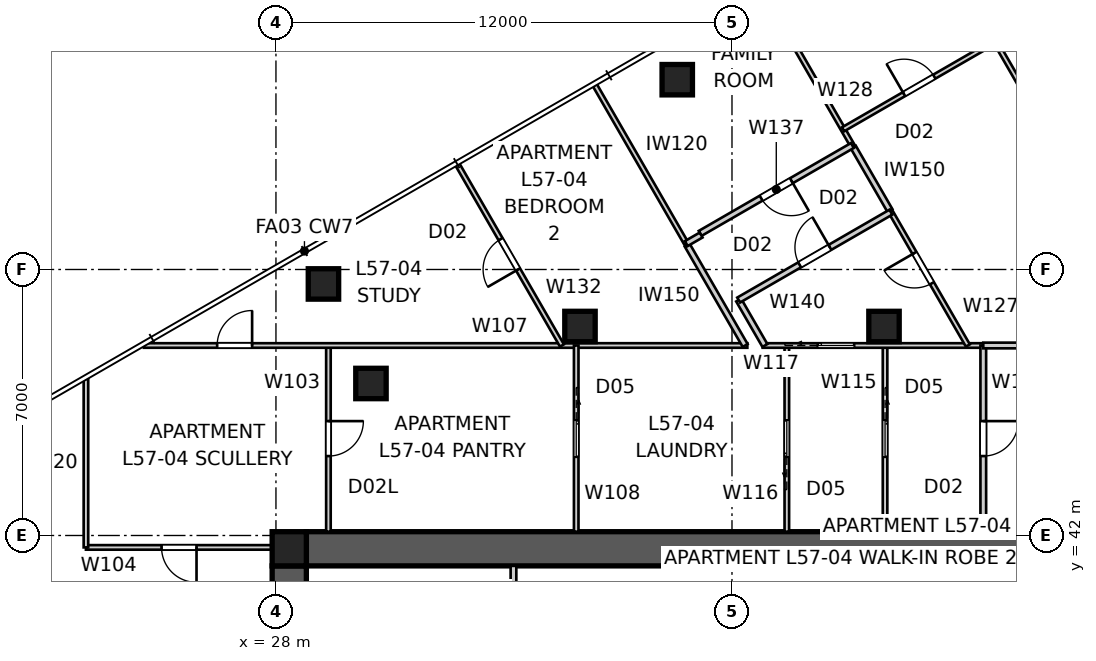
"""IFC4 building model, lengths in metres.
Left out: names, types, materials, properties, quantities, classifications, styles, units other than length and angle.
Written with IfcOpenShell. Run it as: python <this file> out.ifc"""

import sys

from ifc_helpers import new_model, si_unit, direction, frame, frame_2d, origin, origin_2d, place, context, subcontext, project, spatial, polyline, rectangle, outline, extrude, element, fill, save


model = new_model("IFC4")
c1 = context("Model", 3, precision=1e-05, world=origin(), true_north=direction((0.0, 1.0)))
c2 = subcontext(c1, "Body", "Model", "MODEL_VIEW")
j1 = project(units=[si_unit("LENGTHUNIT", "METRE"), si_unit("PLANEANGLEUNIT", "RADIAN")], contexts=[c1])
p1 = place(None, origin())
s1 = spatial("IfcSite", under=j1, at=p1, CompositionType="ELEMENT")
p2 = place(p1, origin())
s2 = spatial("IfcBuilding", under=s1, at=p2, CompositionType="ELEMENT")
p3 = place(p2, frame((0.0, 0.0, 208.2)))
s3 = spatial("IfcBuildingStorey", under=s2, at=p3, CompositionType="ELEMENT", Elevation=208.2)
p4 = place(p3, frame((28.8, 41.65, 0.0), z_axis=(0.0, 0.0, 1.0), x_axis=(1.0, 0.0, 0.0)))
e1 = element("IfcWall", 1, at=p4, inside=s3, PredefinedType="SHEAR", context=c2, shape_type="SweptSolid", body=[
    extrude(outline(polyline([(0.0, -0.45), (22.4, -0.45), (22.4, -0.025), (22.85, -0.025), (22.85, 0.025), (22.4, 0.025), (22.4, 0.45), (0.0, 0.45), (0.0, 0.025), (-0.45, 0.025), (-0.45, -0.025), (0.0, -0.025), (0.0, -0.45)])), origin(), (0.0, 0.0, 1.0), 3.4),
])
p5 = place(p3, frame((28.35, 41.2, 0.0), z_axis=(0.0, 0.0, 1.0), x_axis=(0.0, -1.0, 0.0)))
e2 = element("IfcWall", 2, at=p5, inside=s3, PredefinedType="SHEAR", context=c2, shape_type="SweptSolid", body=[
    extrude(outline(polyline([(0.0, -0.45), (22.4, -0.45), (22.4, -0.025), (22.85, -0.025), (22.85, 0.025), (22.4, 0.025), (22.4, 0.45), (0.0, 0.45), (0.0, 0.025), (-0.45, 0.025), (-0.45, -0.025), (0.0, -0.025), (0.0, -0.45)])), origin(), (0.0, 0.0, 1.0), 3.4),
])
p6 = place(p5, frame((11.14, 0.0, 0.0)))
e3 = element("IfcOpeningElement", 3, at=p6, cuts=e2, PredefinedType="OPENING", context=c2, shape_type="SweptSolid", body=[
    extrude(rectangle(XDim=1.02, YDim=2.4, at=frame_2d((0.51, 1.2))), frame((0.0, 0.46, 0.0), z_axis=(0.0, -1.0, 0.0), x_axis=(1.0, 0.0, 0.0)), (0.0, 0.0, 1.0), 0.92),
])
p7 = place(p3, frame((28.35, 41.65, 0.0), z_axis=(0.0, 0.0, 1.0), x_axis=(1.0, 0.0, 0.0)))
e4 = element("IfcColumn", 4, at=p7, inside=s3, PredefinedType="COLUMN", context=c2, shape_type="SweptSolid", body=[
    extrude(rectangle(XDim=0.9, YDim=0.9, at=origin_2d()), origin(), (0.0, 0.0, 1.0), 3.4),
])
for number, where, z_axis, x_axis in (
    (5, (38.56, 53.995, -0.15), (0.0, 0.0, 1.0), (1.0, 0.0, 0.0)),
    (6, (29.25, 48.62, -0.15), (0.0, 0.0, 1.0), (1.0, 0.0, 0.0)),
):
    element("IfcColumn", number, at=place(p3, frame(where, z_axis=z_axis, x_axis=x_axis)), inside=s3, PredefinedType="COLUMN", context=c2, shape_type="SweptSolid", body=[
        extrude(rectangle(XDim=0.8, YDim=0.8, at=origin_2d()), origin(), (0.0, 0.0, 1.0), 3.55),
    ])
for number, where, z_axis, x_axis in (
    (7, (44.0, 47.5, 0.0), (0.0, 0.0, 1.0), (1.0, 0.0, 0.0)),
    (8, (36.0, 47.5, 0.0), (0.0, 0.0, 1.0), (1.0, 0.0, 0.0)),
    (9, (30.5, 46.0, 0.0), (0.0, 0.0, 1.0), (1.0, 0.0, 0.0)),
):
    element("IfcColumn", number, at=place(p3, frame(where, z_axis=z_axis, x_axis=x_axis)), inside=s3, PredefinedType="COLUMN", context=c2, shape_type="SweptSolid", body=[
        extrude(rectangle(XDim=0.8, YDim=0.8, at=origin_2d()), origin(), (0.0, 0.0, 1.0), 3.4),
    ])
p8 = place(p3, frame((34.25, 41.2, 0.0), z_axis=(0.0, 0.0, 1.0), x_axis=(0.0, -1.0, 0.0)))
e10 = element("IfcWall", 10, at=p8, inside=s3, PredefinedType="SOLIDWALL", context=c2, shape_type="SweptSolid", body=[
    extrude(rectangle(XDim=5.95, YDim=0.15, at=frame_2d((2.975, 0.0))), origin(), (0.0, 0.0, 1.0), 3.25),
])
p9 = place(p8, frame((2.515, 0.0, 0.0)))
e11 = element("IfcOpeningElement", 11, at=p9, cuts=e10, PredefinedType="OPENING", context=c2, shape_type="SweptSolid", body=[
    extrude(rectangle(XDim=0.92, YDim=2.1, at=frame_2d((0.46, 1.05))), frame((0.0, 0.085, 0.0), z_axis=(0.0, -1.0, 0.0), x_axis=(1.0, 0.0, 0.0)), (0.0, 0.0, 1.0), 0.17),
])
p10 = place(p3, frame((29.381, 47.0, 0.0), z_axis=(0.0, 0.0, 1.0), x_axis=(0.0, -1.0, 0.0)))
e12 = element("IfcWall", 12, at=p10, inside=s3, PredefinedType="PARTITIONING", context=c2, shape_type="SweptSolid", body=[
    extrude(rectangle(XDim=4.9, YDim=0.12, at=frame_2d((2.45, 0.0))), origin(), (0.0, 0.0, 1.0), 3.25),
])
p11 = place(p10, frame((1.99, 0.0, 0.0)))
e13 = element("IfcOpeningElement", 13, at=p11, cuts=e12, PredefinedType="OPENING", context=c2, shape_type="SweptSolid", body=[
    extrude(rectangle(XDim=0.92, YDim=2.1, at=frame_2d((0.46, 1.05))), frame((0.0, 0.07, 0.0), z_axis=(0.0, -1.0, 0.0), x_axis=(1.0, 0.0, 0.0)), (0.0, 0.0, 1.0), 0.14),
])
p12 = place(p3, frame((27.9, 41.687, 0.0), z_axis=(0.0, 0.0, 1.0), x_axis=(-1.0, 0.0, 0.0)))
e14 = element("IfcWall", 14, at=p12, inside=s3, PredefinedType="PARTITIONING", context=c2, shape_type="SweptSolid", body=[
    extrude(rectangle(XDim=4.9, YDim=0.12, at=frame_2d((2.45, 0.0))), origin(), (0.0, 0.0, 1.0), 3.25),
])
p13 = place(p12, frame((1.99, 0.0, 0.0)))
e15 = element("IfcOpeningElement", 15, at=p13, cuts=e14, PredefinedType="OPENING", context=c2, shape_type="SweptSolid", body=[
    extrude(rectangle(XDim=0.92, YDim=2.1, at=frame_2d((0.46, 1.05))), frame((0.0, 0.07, 0.0), z_axis=(0.0, -1.0, 0.0), x_axis=(1.0, 0.0, 0.0)), (0.0, 0.0, 1.0), 0.14),
])
p14 = place(p3, frame((23.0, 41.687, 0.0), z_axis=(0.0, 0.0, 1.0), x_axis=(0.0, 1.0, 0.0)))
e16 = element("IfcWall", 16, at=p14, inside=s3, PredefinedType="PARTITIONING", context=c2, shape_type="SweptSolid", body=[
    extrude(rectangle(XDim=4.433, YDim=0.12, at=frame_2d((2.216, 0.0))), origin(), (0.0, 0.0, 1.0), 3.25),
])
p15 = place(p3, frame((24.525, 47.0, 0.0), z_axis=(0.0, 0.0, 1.0), x_axis=(1.0, 0.0, 0.0)))
e17 = element("IfcWall", 17, at=p15, inside=s3, PredefinedType="PARTITIONING", context=c2, shape_type="SweptSolid", body=[
    extrude(rectangle(XDim=15.879, YDim=0.12, at=frame_2d((7.939, 0.0))), origin(), (0.0, 0.0, 1.0), 2.55),
])
p16 = place(p15, frame((1.928, 0.0, 0.0)))
e18 = element("IfcOpeningElement", 18, at=p16, cuts=e17, PredefinedType="OPENING", context=c2, shape_type="SweptSolid", body=[
    extrude(rectangle(XDim=0.92, YDim=2.1, at=frame_2d((0.46, 1.05))), frame((0.0, 0.07, 0.0), z_axis=(0.0, -1.0, 0.0), x_axis=(1.0, 0.0, 0.0)), (0.0, 0.0, 1.0), 0.14),
])
p17 = place(p3, frame((35.901, 47.0, 0.0), z_axis=(0.0, 0.0, 1.0), x_axis=(0.0, -1.0, 0.0)))
e19 = element("IfcWall", 19, at=p17, inside=s3, PredefinedType="PARTITIONING", context=c2, shape_type="SweptSolid", body=[
    extrude(rectangle(XDim=4.9, YDim=0.12, at=frame_2d((2.45, 0.0))), origin(), (0.0, 0.0, 1.0), 3.25),
])
p18 = place(p17, frame((1.97, 0.0, 0.0)))
e20 = element("IfcOpeningElement", 20, at=p18, cuts=e19, PredefinedType="OPENING", context=c2, shape_type="SweptSolid", body=[
    extrude(rectangle(XDim=0.96, YDim=2.1, at=frame_2d((0.48, 1.05))), frame((0.0, 0.07, 0.0), z_axis=(0.0, -1.0, 0.0), x_axis=(1.0, 0.0, 0.0)), (0.0, 0.0, 1.0), 0.14),
])
p19 = place(p3, frame((44.028, 47.0, 0.0), z_axis=(0.0, 0.0, 1.0), x_axis=(0.0, -1.0, 0.0)))
e21 = element("IfcWall", 21, at=p19, inside=s3, PredefinedType="PARTITIONING", context=c2, shape_type="SweptSolid", body=[
    extrude(rectangle(XDim=4.9, YDim=0.12, at=frame_2d((2.45, 0.0))), origin(), (0.0, 0.0, 1.0), 3.25),
])
p20 = place(p19, frame((1.97, 0.0, 0.0)))
e22 = element("IfcOpeningElement", 22, at=p20, cuts=e21, PredefinedType="OPENING", context=c2, shape_type="SweptSolid", body=[
    extrude(rectangle(XDim=0.96, YDim=2.1, at=frame_2d((0.48, 1.05))), frame((0.0, 0.07, 0.0), z_axis=(0.0, -1.0, 0.0), x_axis=(1.0, 0.0, 0.0)), (0.0, 0.0, 1.0), 0.14),
])
p21 = place(p3, frame((41.443, 42.1, 0.0), z_axis=(0.0, 0.0, 1.0), x_axis=(0.0, 1.0, 0.0)))
e23 = element("IfcWall", 23, at=p21, inside=s3, PredefinedType="PARTITIONING", context=c2, shape_type="SweptSolid", body=[
    extrude(rectangle(XDim=4.9, YDim=0.12, at=frame_2d((2.45, 0.0))), origin(), (0.0, 0.0, 1.0), 3.25),
])
p22 = place(p21, frame((1.97, 0.0, 0.0)))
e24 = element("IfcOpeningElement", 24, at=p22, cuts=e23, PredefinedType="OPENING", context=c2, shape_type="SweptSolid", body=[
    extrude(rectangle(XDim=0.96, YDim=2.1, at=frame_2d((0.48, 1.05))), frame((0.0, 0.07, 0.0), z_axis=(0.0, -1.0, 0.0), x_axis=(1.0, 0.0, 0.0)), (0.0, 0.0, 1.0), 0.14),
])
p23 = place(p3, frame((40.808, 47.0, 0.0), z_axis=(0.0, 0.0, 1.0), x_axis=(1.0, 0.0, 0.0)))
e25 = element("IfcWall", 25, at=p23, inside=s3, PredefinedType="PARTITIONING", context=c2, shape_type="SweptSolid", body=[
    extrude(rectangle(XDim=5.804, YDim=0.12, at=frame_2d((2.902, 0.0))), origin(), (0.0, 0.0, 1.0), 2.55),
])
p24 = place(p23, frame((1.447, 0.0, 0.0)))
e26 = element("IfcOpeningElement", 26, at=p24, cuts=e25, PredefinedType="OPENING", context=c2, shape_type="SweptSolid", body=[
    extrude(rectangle(XDim=0.96, YDim=2.1, at=frame_2d((0.48, 1.05))), frame((0.0, 0.07, 0.0), z_axis=(0.0, -1.0, 0.0), x_axis=(1.0, 0.0, 0.0)), (0.0, 0.0, 1.0), 0.14),
])
p25 = place(p3, frame((46.612, 47.0, 0.0), z_axis=(0.0, 0.0, 1.0), x_axis=(0.0, -1.0, 0.0)))
e27 = element("IfcWall", 27, at=p25, inside=s3, PredefinedType="SOLIDWALL", context=c2, shape_type="SweptSolid", body=[
    extrude(rectangle(XDim=4.9, YDim=0.15, at=frame_2d((2.45, 0.0))), origin(), (0.0, 0.0, 1.0), 3.25),
])
p26 = place(p25, frame((1.99, 0.0, 0.0)))
e28 = element("IfcOpeningElement", 28, at=p26, cuts=e27, PredefinedType="OPENING", context=c2, shape_type="SweptSolid", body=[
    extrude(rectangle(XDim=0.92, YDim=2.34, at=frame_2d((0.46, 1.17))), frame((0.0, 0.085, 0.0), z_axis=(0.0, -1.0, 0.0), x_axis=(1.0, 0.0, 0.0)), (0.0, 0.0, 1.0), 0.17),
])
p27 = place(p3, frame((46.612, 47.0, 0.0), z_axis=(0.0, 0.0, 1.0), x_axis=(1.0, 0.0, 0.0)))
e29 = element("IfcWall", 29, at=p27, inside=s3, PredefinedType="SOLIDWALL", context=c2, shape_type="SweptSolid", body=[
    extrude(rectangle(XDim=2.585, YDim=0.15, at=frame_2d((1.292, 0.0))), origin(), (0.0, 0.0, 1.0), 3.25),
])
p28 = place(p3, frame((43.193, 52.219, 0.0), z_axis=(0.0, 0.0, 1.0), x_axis=(-0.50000634465, 0.866021740668, 0.0)))
e30 = element("IfcWall", 30, at=p28, inside=s3, PredefinedType="PARTITIONING", context=c2, shape_type="SweptSolid", body=[
    extrude(rectangle(XDim=4.814, YDim=0.12, at=frame_2d((2.407, 0.0))), origin(), (0.0, 0.0, 1.0), 3.25),
])
p29 = place(p3, frame((46.207, 47.0, 0.0), z_axis=(0.0, 0.0, 1.0), x_axis=(-0.499986975689, 0.866032923243, 0.0)))
e31 = element("IfcWall", 31, at=p29, inside=s3, PredefinedType="PARTITIONING", context=c2, shape_type="SweptSolid", body=[
    extrude(rectangle(XDim=4.101, YDim=0.12, at=frame_2d((2.051, 0.0))), origin(), (0.0, 0.0, 1.0), 3.25),
])
p30 = place(p29, frame((1.891, 0.0, 0.0)))
e32 = element("IfcOpeningElement", 32, at=p30, cuts=e31, PredefinedType="OPENING", context=c2, shape_type="SweptSolid", body=[
    extrude(rectangle(XDim=0.92, YDim=2.34, at=frame_2d((0.46, 1.17))), frame((0.0, 0.07, 0.0), z_axis=(0.0, -1.0, 0.0), x_axis=(1.0, 0.0, 0.0)), (0.0, 0.0, 1.0), 0.14),
])
p31 = place(p3, frame((42.922, 52.688, 0.0), z_axis=(0.0, 0.0, 1.0), x_axis=(0.866025598446, 0.499999662836, 0.0)))
e33 = element("IfcWall", 33, at=p31, inside=s3, PredefinedType="PARTITIONING", context=c2, shape_type="SweptSolid", body=[
    extrude(rectangle(XDim=4.625, YDim=0.12, at=frame_2d((2.312, 0.0))), origin(), (0.0, 0.0, 1.0), 3.25),
])
p32 = place(p31, frame((1.853, 0.0, 0.0)))
e34 = element("IfcOpeningElement", 34, at=p32, cuts=e33, PredefinedType="OPENING", context=c2, shape_type="SweptSolid", body=[
    extrude(rectangle(XDim=0.92, YDim=2.34, at=frame_2d((0.46, 1.17))), frame((0.0, 0.07, 0.0), z_axis=(0.0, -1.0, 0.0), x_axis=(1.0, 0.0, 0.0)), (0.0, 0.0, 1.0), 0.14),
])
p33 = place(p3, frame((46.792, 55.237, 0.0), z_axis=(0.0, 0.0, 1.0), x_axis=(0.500018023529, -0.866014997645, 0.0)))
e35 = element("IfcWall", 35, at=p33, inside=s3, PredefinedType="PARTITIONING", context=c2, shape_type="SweptSolid", body=[
    extrude(rectangle(XDim=4.576, YDim=0.12, at=frame_2d((2.288, 0.0))), origin(), (0.0, 0.0, 1.0), 3.25),
])
p34 = place(p33, frame((1.964, 0.0, 0.0)))
e36 = element("IfcOpeningElement", 36, at=p34, cuts=e35, PredefinedType="OPENING", context=c2, shape_type="SweptSolid", body=[
    extrude(rectangle(XDim=0.92, YDim=2.34, at=frame_2d((0.46, 1.17))), frame((0.0, 0.07, 0.0), z_axis=(0.0, -1.0, 0.0), x_axis=(1.0, 0.0, 0.0)), (0.0, 0.0, 1.0), 0.14),
])
p35 = place(p3, frame((44.156, 50.552, 0.0), z_axis=(0.0, 0.0, 1.0), x_axis=(-0.50001143954, 0.866018799062, 0.0)))
e37 = element("IfcWall", 37, at=p35, inside=s3, PredefinedType="SOLIDWALL", context=c2, shape_type="SweptSolid", body=[
    extrude(rectangle(XDim=1.926, YDim=0.15, at=frame_2d((0.963, 0.0))), origin(), (0.0, 0.0, 1.0), 3.25),
])
p36 = place(p3, frame((35.525, 47.0, 0.0), z_axis=(0.0, 0.0, 1.0), x_axis=(-0.49997732567, 0.866038494419, 0.0)))
e38 = element("IfcWall", 38, at=p36, inside=s3, PredefinedType="PARTITIONING", context=c2, shape_type="SweptSolid", body=[
    extrude(rectangle(XDim=5.5, YDim=0.12, at=frame_2d((2.75, 0.0))), origin(), (0.0, 0.0, 1.0), 3.25),
])
p37 = place(p36, frame((2.31, 0.0, 0.0)))
e39 = element("IfcOpeningElement", 39, at=p37, cuts=e38, PredefinedType="OPENING", context=c2, shape_type="SweptSolid", body=[
    extrude(rectangle(XDim=0.92, YDim=2.34, at=frame_2d((0.46, 1.17))), frame((0.0, 0.07, 0.0), z_axis=(0.0, -1.0, 0.0), x_axis=(1.0, 0.0, 0.0)), (0.0, 0.0, 1.0), 0.14),
])
p38 = place(p3, frame((36.391, 53.851, 0.0), z_axis=(0.0, 0.0, 1.0), x_axis=(0.500036734544, -0.866004194047, 0.0)))
e40 = element("IfcWall", 40, at=p38, inside=s3, PredefinedType="PARTITIONING", context=c2, shape_type="SweptSolid", body=[
    extrude(rectangle(XDim=4.864, YDim=0.12, at=frame_2d((2.432, 0.0))), origin(), (0.0, 0.0, 1.0), 3.25),
])
p39 = place(p3, frame((38.823, 49.639, 0.0), z_axis=(0.0, 0.0, 1.0), x_axis=(0.499999897272, -0.866025463095, 0.0)))
e41 = element("IfcWall", 41, at=p39, inside=s3, PredefinedType="SOLIDWALL", context=c2, shape_type="SweptSolid", body=[
    extrude(rectangle(XDim=3.047, YDim=0.15, at=frame_2d((1.523, 0.0))), origin(), (0.0, 0.0, 1.0), 3.25),
])
p40 = place(p3, frame((43.168, 52.263, 0.0), z_axis=(0.0, 0.0, 1.0), x_axis=(-0.866025598446, -0.499999662836, 0.0)))
e42 = element("IfcWall", 42, at=p40, inside=s3, PredefinedType="SOLIDWALL", context=c2, shape_type="SweptSolid", body=[
    extrude(rectangle(XDim=4.625, YDim=0.15, at=frame_2d((2.312, 0.0))), origin(), (0.0, 0.0, 1.0), 3.25),
])
p41 = place(p40, frame((1.853, 0.0, 0.0)))
e43 = element("IfcOpeningElement", 43, at=p41, cuts=e42, PredefinedType="OPENING", context=c2, shape_type="SweptSolid", body=[
    extrude(rectangle(XDim=0.92, YDim=2.34, at=frame_2d((0.46, 1.17))), frame((0.0, 0.085, 0.0), z_axis=(0.0, -1.0, 0.0), x_axis=(1.0, 0.0, 0.0)), (0.0, 0.0, 1.0), 0.17),
])
p42 = place(p3, frame((39.188, 49.907, 0.0), z_axis=(0.0, 0.0, 1.0), x_axis=(-0.865896406789, -0.500223362819, 0.0)))
e44 = element("IfcWall", 44, at=p42, inside=s3, PredefinedType="SOLIDWALL", context=c2, shape_type="SweptSolid", body=[
    extrude(rectangle(XDim=0.45, YDim=0.15, at=frame_2d((0.225, 0.0))), origin(), (0.0, 0.0, 1.0), 3.25),
])
p43 = place(p3, frame((40.866, 47.0, 0.0), z_axis=(0.0, 0.0, 1.0), x_axis=(-0.499941797271, 0.866059004538, 0.0)))
e45 = element("IfcWall", 45, at=p43, inside=s3, PredefinedType="SOLIDWALL", context=c2, shape_type="SweptSolid", body=[
    extrude(rectangle(XDim=1.381, YDim=0.15, at=frame_2d((0.69, 0.0))), origin(), (0.0, 0.0, 1.0), 3.25),
])
p44 = place(p3, frame((40.176, 48.196, 0.0), z_axis=(0.0, 0.0, 1.0), x_axis=(0.866025598446, 0.499999662836, 0.0)))
e46 = element("IfcWall", 46, at=p44, inside=s3, PredefinedType="SOLIDWALL", context=c2, shape_type="SweptSolid", body=[
    extrude(rectangle(XDim=4.625, YDim=0.15, at=frame_2d((2.312, 0.0))), origin(), (0.0, 0.0, 1.0), 3.25),
])
p45 = place(p44, frame((1.853, 0.0, 0.0)))
e47 = element("IfcOpeningElement", 47, at=p45, cuts=e46, PredefinedType="OPENING", context=c2, shape_type="SweptSolid", body=[
    extrude(rectangle(XDim=0.92, YDim=2.34, at=frame_2d((0.46, 1.17))), frame((0.0, 0.085, 0.0), z_axis=(0.0, -1.0, 0.0), x_axis=(1.0, 0.0, 0.0)), (0.0, 0.0, 1.0), 0.17),
])
p46 = place(p3, frame((27.9, 41.687, 0.0), z_axis=(0.0, 0.0, 1.0), x_axis=(0.999162409553, -0.040920402453, 0.0)))
e48 = element("IfcWall", 48, at=p46, inside=s3, PredefinedType="PARTITIONING", context=c2, shape_type="SweptSolid", body=[
    extrude(rectangle(XDim=0.901, YDim=0.12, at=frame_2d((0.45, 0.0))), origin(), (0.0, 0.0, 1.0), 3.25),
])
p47 = place(p13, origin())
e49 = element("IfcDoor", 49, at=p47, inside=s3, OperationType="SINGLE_SWING_LEFT", PredefinedType="DOOR", context=c2, shape_type="SweptSolid", body=[
    extrude(rectangle(XDim=0.92, YDim=2.1, at=frame_2d((0.46, 1.05))), frame((0.0, 0.025, 0.0), z_axis=(0.0, -1.0, 0.0), x_axis=(1.0, 0.0, 0.0)), (0.0, 0.0, 1.0), 0.05),
])
fill(e15, e49)
p48 = place(p16, origin())
e50 = element("IfcDoor", 50, at=p48, inside=s3, OperationType="SINGLE_SWING_RIGHT", PredefinedType="DOOR", context=c2, shape_type="SweptSolid", body=[
    extrude(rectangle(XDim=0.92, YDim=2.1, at=frame_2d((0.46, 1.05))), frame((0.0, 0.025, 0.0), z_axis=(0.0, -1.0, 0.0), x_axis=(1.0, 0.0, 0.0)), (0.0, 0.0, 1.0), 0.05),
])
fill(e18, e50)
p49 = place(p11, origin())
e51 = element("IfcDoor", 51, at=p49, inside=s3, OperationType="SINGLE_SWING_LEFT", PredefinedType="DOOR", context=c2, shape_type="SweptSolid", body=[
    extrude(rectangle(XDim=0.92, YDim=2.1, at=frame_2d((0.46, 1.05))), frame((0.0, 0.025, 0.0), z_axis=(0.0, -1.0, 0.0), x_axis=(1.0, 0.0, 0.0)), (0.0, 0.0, 1.0), 0.05),
])
fill(e13, e51)
p50 = place(p37, origin())
e52 = element("IfcDoor", 52, at=p50, inside=s3, OperationType="SINGLE_SWING_LEFT", PredefinedType="DOOR", context=c2, shape_type="SweptSolid", body=[
    extrude(rectangle(XDim=0.92, YDim=2.34, at=frame_2d((0.46, 1.17))), frame((0.0, 0.025, 0.0), z_axis=(0.0, -1.0, 0.0), x_axis=(1.0, 0.0, 0.0)), (0.0, 0.0, 1.0), 0.05),
])
fill(e39, e52)
p51 = place(p18, origin())
e53 = element("IfcDoor", 53, at=p51, inside=s3, OperationType="SLIDING_TO_LEFT", PredefinedType="DOOR", context=c2, shape_type="SweptSolid", body=[
    extrude(rectangle(XDim=0.96, YDim=2.1, at=frame_2d((0.48, 1.05))), frame((0.0, 0.025, 0.0), z_axis=(0.0, -1.0, 0.0), x_axis=(1.0, 0.0, 0.0)), (0.0, 0.0, 1.0), 0.05),
])
fill(e20, e53)
p52 = place(p22, origin())
e54 = element("IfcDoor", 54, at=p52, inside=s3, OperationType="SLIDING_TO_LEFT", PredefinedType="DOOR", context=c2, shape_type="SweptSolid", body=[
    extrude(rectangle(XDim=0.96, YDim=2.1, at=frame_2d((0.48, 1.05))), frame((0.0, 0.025, 0.0), z_axis=(0.0, -1.0, 0.0), x_axis=(1.0, 0.0, 0.0)), (0.0, 0.0, 1.0), 0.05),
])
fill(e24, e54)
p53 = place(p20, origin())
e55 = element("IfcDoor", 55, at=p53, inside=s3, OperationType="SLIDING_TO_LEFT", PredefinedType="DOOR", context=c2, shape_type="SweptSolid", body=[
    extrude(rectangle(XDim=0.96, YDim=2.1, at=frame_2d((0.48, 1.05))), frame((0.0, 0.025, 0.0), z_axis=(0.0, -1.0, 0.0), x_axis=(1.0, 0.0, 0.0)), (0.0, 0.0, 1.0), 0.05),
])
fill(e22, e55)
p54 = place(p24, origin())
e56 = element("IfcDoor", 56, at=p54, inside=s3, OperationType="SLIDING_TO_LEFT", PredefinedType="DOOR", context=c2, shape_type="SweptSolid", body=[
    extrude(rectangle(XDim=0.96, YDim=2.1, at=frame_2d((0.48, 1.05))), frame((0.0, 0.025, 0.0), z_axis=(0.0, -1.0, 0.0), x_axis=(1.0, 0.0, 0.0)), (0.0, 0.0, 1.0), 0.05),
])
fill(e26, e56)
p55 = place(p26, origin())
e57 = element("IfcDoor", 57, at=p55, inside=s3, OperationType="SINGLE_SWING_LEFT", PredefinedType="DOOR", context=c2, shape_type="SweptSolid", body=[
    extrude(rectangle(XDim=0.92, YDim=2.34, at=frame_2d((0.46, 1.17))), frame((0.0, 0.025, 0.0), z_axis=(0.0, -1.0, 0.0), x_axis=(1.0, 0.0, 0.0)), (0.0, 0.0, 1.0), 0.05),
])
fill(e28, e57)
p56 = place(p45, origin())
e58 = element("IfcDoor", 58, at=p56, inside=s3, OperationType="SINGLE_SWING_RIGHT", PredefinedType="DOOR", context=c2, shape_type="SweptSolid", body=[
    extrude(rectangle(XDim=0.92, YDim=2.34, at=frame_2d((0.46, 1.17))), frame((0.0, 0.025, 0.0), z_axis=(0.0, -1.0, 0.0), x_axis=(1.0, 0.0, 0.0)), (0.0, 0.0, 1.0), 0.05),
])
fill(e47, e58)
p57 = place(p30, origin())
e59 = element("IfcDoor", 59, at=p57, inside=s3, OperationType="SINGLE_SWING_RIGHT", PredefinedType="DOOR", context=c2, shape_type="SweptSolid", body=[
    extrude(rectangle(XDim=0.92, YDim=2.34, at=frame_2d((0.46, 1.17))), frame((0.0, 0.025, 0.0), z_axis=(0.0, -1.0, 0.0), x_axis=(1.0, 0.0, 0.0)), (0.0, 0.0, 1.0), 0.05),
])
fill(e32, e59)
p58 = place(p41, origin())
e60 = element("IfcDoor", 60, at=p58, inside=s3, OperationType="SINGLE_SWING_LEFT", PredefinedType="DOOR", context=c2, shape_type="SweptSolid", body=[
    extrude(rectangle(XDim=0.92, YDim=2.34, at=frame_2d((0.46, 1.17))), frame((0.0, 0.025, 0.0), z_axis=(0.0, -1.0, 0.0), x_axis=(1.0, 0.0, 0.0)), (0.0, 0.0, 1.0), 0.05),
])
fill(e43, e60)
p59 = place(p32, origin())
e61 = element("IfcDoor", 61, at=p59, inside=s3, OperationType="SINGLE_SWING_LEFT", PredefinedType="DOOR", context=c2, shape_type="SweptSolid", body=[
    extrude(rectangle(XDim=0.92, YDim=2.34, at=frame_2d((0.46, 1.17))), frame((0.0, 0.025, 0.0), z_axis=(0.0, -1.0, 0.0), x_axis=(1.0, 0.0, 0.0)), (0.0, 0.0, 1.0), 0.05),
])
fill(e34, e61)
save(model, sys.argv[1])
